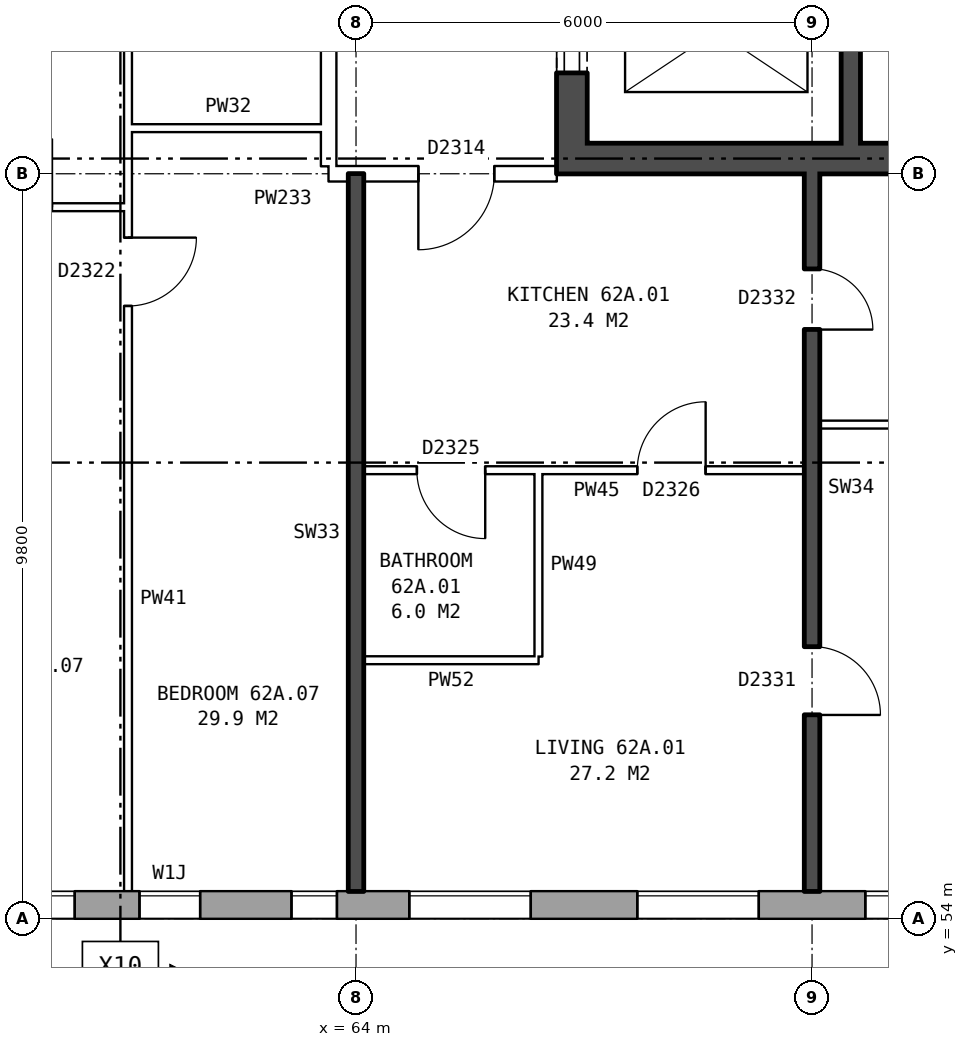
"""IFC4 building model, lengths in metres.
Left out: names, types, materials, properties, quantities, classifications, styles, units other than length and angle.
Written with IfcOpenShell. Run it as: python <this file> out.ifc"""

import sys

from ifc_helpers import new_model, si_unit, direction, frame, frame_2d, origin, place, context, subcontext, project, spatial, rectangle, extrude, element, fill, save


model = new_model("IFC4")
c1 = context("Model", 3, precision=1e-05, world=origin(), true_north=direction((0.0, 1.0)))
c2 = subcontext(c1, "Body", "Model", "MODEL_VIEW")
j1 = project(units=[si_unit("LENGTHUNIT", "METRE"), si_unit("PLANEANGLEUNIT", "RADIAN")], contexts=[c1])
p1 = place(None, origin())
s1 = spatial("IfcSite", under=j1, at=p1, CompositionType="ELEMENT")
p2 = place(p1, origin())
s2 = spatial("IfcBuilding", under=s1, at=p2, CompositionType="ELEMENT")
p3 = place(p2, frame((0.0, 0.0, 221.4)))
s3 = spatial("IfcBuildingStorey", under=s2, at=p3, CompositionType="ELEMENT", Elevation=221.4)
p4 = place(p3, frame((35.075, 54.18, 0.0), z_axis=(0.0, 0.0, 1.0), x_axis=(1.0, 0.0, 0.0)))
e1 = element("IfcWall", 1, at=p4, inside=s3, PredefinedType="STANDARD", context=c2, shape_type="SweptSolid", body=[
    extrude(rectangle(XDim=39.875, YDim=0.36, at=frame_2d((19.938, 0.0))), origin(), (0.0, 0.0, 1.0), 2.85),
])
p5 = place(p4, frame((2.625, 0.0, 0.8)))
e2 = element("IfcOpeningElement", 2, at=p5, cuts=e1, PredefinedType="OPENING", context=c2, shape_type="SweptSolid", body=[
    extrude(rectangle(XDim=1.6, YDim=1.8, at=frame_2d((0.8, 0.9))), frame((0.0, 0.19, 0.0), z_axis=(0.0, -1.0, 0.0), x_axis=(1.0, 0.0, 0.0)), (0.0, 0.0, 1.0), 0.38),
])
p6 = place(p4, frame((5.625, 0.0, 0.8)))
e3 = element("IfcOpeningElement", 3, at=p6, cuts=e1, PredefinedType="OPENING", context=c2, shape_type="SweptSolid", body=[
    extrude(rectangle(XDim=1.6, YDim=1.8, at=frame_2d((0.8, 0.9))), frame((0.0, 0.19, 0.0), z_axis=(0.0, -1.0, 0.0), x_axis=(1.0, 0.0, 0.0)), (0.0, 0.0, 1.0), 0.38),
])
p7 = place(p4, frame((7.525, 0.0, 0.8)))
e4 = element("IfcOpeningElement", 4, at=p7, cuts=e1, PredefinedType="OPENING", context=c2, shape_type="SweptSolid", body=[
    extrude(rectangle(XDim=1.4, YDim=1.8, at=frame_2d((0.7, 0.9))), frame((0.0, 0.19, 0.0), z_axis=(0.0, -1.0, 0.0), x_axis=(1.0, 0.0, 0.0)), (0.0, 0.0, 1.0), 0.38),
])
p8 = place(p4, frame((11.625, 0.0, 0.8)))
e5 = element("IfcOpeningElement", 5, at=p8, cuts=e1, PredefinedType="OPENING", context=c2, shape_type="SweptSolid", body=[
    extrude(rectangle(XDim=1.6, YDim=1.8, at=frame_2d((0.8, 0.9))), frame((0.0, 0.19, 0.0), z_axis=(0.0, -1.0, 0.0), x_axis=(1.0, 0.0, 0.0)), (0.0, 0.0, 1.0), 0.38),
])
p9 = place(p4, frame((14.625, 0.0, 0.8)))
e6 = element("IfcOpeningElement", 6, at=p9, cuts=e1, PredefinedType="OPENING", context=c2, shape_type="SweptSolid", body=[
    extrude(rectangle(XDim=1.6, YDim=1.8, at=frame_2d((0.8, 0.9))), frame((0.0, 0.19, 0.0), z_axis=(0.0, -1.0, 0.0), x_axis=(1.0, 0.0, 0.0)), (0.0, 0.0, 1.0), 0.38),
])
p10 = place(p4, frame((17.625, 0.0, 0.8)))
e7 = element("IfcOpeningElement", 7, at=p10, cuts=e1, PredefinedType="OPENING", context=c2, shape_type="SweptSolid", body=[
    extrude(rectangle(XDim=1.6, YDim=1.8, at=frame_2d((0.8, 0.9))), frame((0.0, 0.19, 0.0), z_axis=(0.0, -1.0, 0.0), x_axis=(1.0, 0.0, 0.0)), (0.0, 0.0, 1.0), 0.38),
])
p11 = place(p4, frame((20.625, 0.0, 0.8)))
e8 = element("IfcOpeningElement", 8, at=p11, cuts=e1, PredefinedType="OPENING", context=c2, shape_type="SweptSolid", body=[
    extrude(rectangle(XDim=1.6, YDim=1.8, at=frame_2d((0.8, 0.9))), frame((0.0, 0.19, 0.0), z_axis=(0.0, -1.0, 0.0), x_axis=(1.0, 0.0, 0.0)), (0.0, 0.0, 1.0), 0.38),
])
p12 = place(p4, frame((23.625, 0.0, 0.8)))
e9 = element("IfcOpeningElement", 9, at=p12, cuts=e1, PredefinedType="OPENING", context=c2, shape_type="SweptSolid", body=[
    extrude(rectangle(XDim=1.6, YDim=1.8, at=frame_2d((0.8, 0.9))), frame((0.0, 0.19, 0.0), z_axis=(0.0, -1.0, 0.0), x_axis=(1.0, 0.0, 0.0)), (0.0, 0.0, 1.0), 0.38),
])
p13 = place(p4, frame((26.075, 0.0, 0.15)))
e10 = element("IfcOpeningElement", 10, at=p13, cuts=e1, PredefinedType="OPENING", context=c2, shape_type="SweptSolid", body=[
    extrude(rectangle(XDim=0.8, YDim=1.5, at=frame_2d((0.4, 0.75))), frame((0.0, 0.19, 0.0), z_axis=(0.0, -1.0, 0.0), x_axis=(1.0, 0.0, 0.0)), (0.0, 0.0, 1.0), 0.38),
])
p14 = place(p4, frame((29.625, 0.0, 0.8)))
e11 = element("IfcOpeningElement", 11, at=p14, cuts=e1, PredefinedType="OPENING", context=c2, shape_type="SweptSolid", body=[
    extrude(rectangle(XDim=1.6, YDim=1.8, at=frame_2d((0.8, 0.9))), frame((0.0, 0.19, 0.0), z_axis=(0.0, -1.0, 0.0), x_axis=(1.0, 0.0, 0.0)), (0.0, 0.0, 1.0), 0.38),
])
p15 = place(p4, frame((32.625, 0.0, 0.8)))
e12 = element("IfcOpeningElement", 12, at=p15, cuts=e1, PredefinedType="OPENING", context=c2, shape_type="SweptSolid", body=[
    extrude(rectangle(XDim=1.6, YDim=1.8, at=frame_2d((0.8, 0.9))), frame((0.0, 0.19, 0.0), z_axis=(0.0, -1.0, 0.0), x_axis=(1.0, 0.0, 0.0)), (0.0, 0.0, 1.0), 0.38),
])
p16 = place(p4, frame((35.625, 0.0, 0.8)))
e13 = element("IfcOpeningElement", 13, at=p16, cuts=e1, PredefinedType="OPENING", context=c2, shape_type="SweptSolid", body=[
    extrude(rectangle(XDim=1.6, YDim=1.8, at=frame_2d((0.8, 0.9))), frame((0.0, 0.19, 0.0), z_axis=(0.0, -1.0, 0.0), x_axis=(1.0, 0.0, 0.0)), (0.0, 0.0, 1.0), 0.38),
])
p17 = place(p4, frame((9.225, 0.0, 1.7)))
e14 = element("IfcOpeningElement", 14, at=p17, cuts=e1, PredefinedType="OPENING", context=c2, shape_type="SweptSolid", body=[
    extrude(rectangle(XDim=0.6, YDim=0.9, at=frame_2d((0.3, 0.45))), frame((0.0, 0.19, 0.0), z_axis=(0.0, -1.0, 0.0), x_axis=(1.0, 0.0, 0.0)), (0.0, 0.0, 1.0), 0.38),
])
p18 = place(p4, frame((28.075, 0.0, 1.65)))
e15 = element("IfcOpeningElement", 15, at=p18, cuts=e1, PredefinedType="OPENING", context=c2, shape_type="SweptSolid", body=[
    extrude(rectangle(XDim=0.6, YDim=0.9, at=frame_2d((0.3, 0.45))), frame((0.0, 0.19, 0.0), z_axis=(0.0, -1.0, 0.0), x_axis=(1.0, 0.0, 0.0)), (0.0, 0.0, 1.0), 0.38),
])
p19 = place(p3, frame((66.84, 63.8, 0.0), z_axis=(0.0, 0.0, 1.0), x_axis=(0.0, 1.0, 0.0)))
e16 = element("IfcWall", 16, at=p19, inside=s3, PredefinedType="SHEAR", context=c2, shape_type="SweptSolid", body=[
    extrude(rectangle(XDim=12.4, YDim=0.4, at=frame_2d((6.2, 0.0))), origin(), (0.0, 0.0, 1.0), 2.85),
])
p20 = place(p19, frame((1.325, 0.0, 0.0)))
e17 = element("IfcOpeningElement", 17, at=p20, cuts=e16, PredefinedType="OPENING", context=c2, shape_type="SweptSolid", body=[
    extrude(rectangle(XDim=1.1, YDim=2.1, at=frame_2d((0.55, 1.05))), frame((0.0, 0.21, 0.0), z_axis=(0.0, -1.0, 0.0), x_axis=(1.0, 0.0, 0.0)), (0.0, 0.0, 1.0), 0.42),
])
p21 = place(p19, frame((3.6, 0.0, 0.0)))
e18 = element("IfcOpeningElement", 18, at=p21, cuts=e16, PredefinedType="OPENING", context=c2, shape_type="SweptSolid", body=[
    extrude(rectangle(XDim=1.1, YDim=2.1, at=frame_2d((0.55, 1.05))), frame((0.0, 0.21, 0.0), z_axis=(0.0, -1.0, 0.0), x_axis=(1.0, 0.0, 0.0)), (0.0, 0.0, 1.0), 0.42),
])
p22 = place(p19, frame((5.8, 0.0, 0.0)))
e19 = element("IfcOpeningElement", 19, at=p22, cuts=e16, PredefinedType="OPENING", context=c2, shape_type="SweptSolid", body=[
    extrude(rectangle(XDim=1.1, YDim=2.1, at=frame_2d((0.55, 1.05))), frame((0.0, 0.21, 0.0), z_axis=(0.0, -1.0, 0.0), x_axis=(1.0, 0.0, 0.0)), (0.0, 0.0, 1.0), 0.42),
])
p23 = place(p19, frame((8.0, 0.0, 0.0)))
e20 = element("IfcOpeningElement", 20, at=p23, cuts=e16, PredefinedType="OPENING", context=c2, shape_type="SweptSolid", body=[
    extrude(rectangle(XDim=1.1, YDim=2.1, at=frame_2d((0.55, 1.05))), frame((0.0, 0.21, 0.0), z_axis=(0.0, -1.0, 0.0), x_axis=(1.0, 0.0, 0.0)), (0.0, 0.0, 1.0), 0.42),
])
p24 = place(p19, frame((9.9, 0.0, 0.0)))
e21 = element("IfcOpeningElement", 21, at=p24, cuts=e16, PredefinedType="OPENING", context=c2, shape_type="SweptSolid", body=[
    extrude(rectangle(XDim=1.1, YDim=2.1, at=frame_2d((0.55, 1.05))), frame((0.0, 0.21, 0.0), z_axis=(0.0, -1.0, 0.0), x_axis=(1.0, 0.0, 0.0)), (0.0, 0.0, 1.0), 0.42),
])
p25 = place(p3, frame((67.04, 64.0, 0.0), z_axis=(0.0, 0.0, 1.0), x_axis=(1.0, 0.0, 0.0)))
e22 = element("IfcWall", 22, at=p25, inside=s3, PredefinedType="SHEAR", context=c2, shape_type="SweptSolid", body=[
    extrude(rectangle(XDim=8.2, YDim=0.4, at=frame_2d((4.1, 0.0))), origin(), (0.0, 0.0, 1.0), 2.85),
])
p26 = place(p3, frame((70.51, 64.2, 0.0), z_axis=(0.0, 0.0, 1.0), x_axis=(0.0, 1.0, 0.0)))
e23 = element("IfcWall", 23, at=p26, inside=s3, PredefinedType="SHEAR", context=c2, shape_type="SweptSolid", body=[
    extrude(rectangle(XDim=2.525, YDim=0.25, at=frame_2d((1.263, 0.0))), origin(), (0.0, 0.0, 1.0), 2.85),
])
p27 = place(p3, frame((63.64, 63.9, 0.0), z_axis=(0.0, 0.0, 1.0), x_axis=(0.0, 1.0, 0.0)))
e24 = element("IfcWall", 24, at=p27, inside=s3, PredefinedType="PARTITIONING", context=c2, shape_type="SweptSolid", body=[
    extrude(rectangle(XDim=12.2, YDim=0.2, at=frame_2d((6.1, 0.0))), origin(), (0.0, 0.0, 1.0), 2.85),
])
p28 = place(p27, frame((5.1, 0.0, 0.0)))
e25 = element("IfcOpeningElement", 25, at=p28, cuts=e24, PredefinedType="OPENING", context=c2, shape_type="SweptSolid", body=[
    extrude(rectangle(XDim=2.0, YDim=2.1, at=frame_2d((1.0, 1.05))), frame((0.0, 0.11, 0.0), z_axis=(0.0, -1.0, 0.0), x_axis=(1.0, 0.0, 0.0)), (0.0, 0.0, 1.0), 0.22),
])
p29 = place(p3, frame((64.1, 57.4, 0.0), z_axis=(0.0, 0.0, 1.0), x_axis=(1.0, 0.0, 0.0)))
e26 = element("IfcWall", 26, at=p29, inside=s3, PredefinedType="PARTITIONING", context=c2, shape_type="SweptSolid", body=[
    extrude(rectangle(XDim=2.3, YDim=0.1, at=frame_2d((1.15, 0.0))), origin(), (0.0, 0.0, 1.0), 2.85),
])
p30 = place(p3, frame((64.1, 59.9, 0.0), z_axis=(0.0, 0.0, 1.0), x_axis=(1.0, 0.0, 0.0)))
e27 = element("IfcWall", 27, at=p30, inside=s3, PredefinedType="PARTITIONING", context=c2, shape_type="SweptSolid", body=[
    extrude(rectangle(XDim=5.8, YDim=0.1, at=frame_2d((2.9, 0.0))), origin(), (0.0, 0.0, 1.0), 2.85),
])
p31 = place(p30, frame((3.6, 0.0, 0.0)))
e28 = element("IfcOpeningElement", 28, at=p31, cuts=e27, PredefinedType="OPENING", context=c2, shape_type="SweptSolid", body=[
    extrude(rectangle(XDim=0.9, YDim=2.1, at=frame_2d((0.45, 1.05))), frame((0.0, 0.06, 0.0), z_axis=(0.0, -1.0, 0.0), x_axis=(1.0, 0.0, 0.0)), (0.0, 0.0, 1.0), 0.12),
])
p32 = place(p30, frame((0.7, 0.0, 0.0)))
e29 = element("IfcOpeningElement", 29, at=p32, cuts=e27, PredefinedType="OPENING", context=c2, shape_type="SweptSolid", body=[
    extrude(rectangle(XDim=0.9, YDim=2.1, at=frame_2d((0.45, 1.05))), frame((0.0, 0.06, 0.0), z_axis=(0.0, -1.0, 0.0), x_axis=(1.0, 0.0, 0.0)), (0.0, 0.0, 1.0), 0.12),
])
p33 = place(p3, frame((70.1, 60.5, 0.0), z_axis=(0.0, 0.0, 1.0), x_axis=(1.0, 0.0, 0.0)))
e30 = element("IfcWall", 30, at=p33, inside=s3, PredefinedType="PARTITIONING", context=c2, shape_type="SweptSolid", body=[
    extrude(rectangle(XDim=5.8, YDim=0.1, at=frame_2d((2.9, 0.0))), origin(), (0.0, 0.0, 1.0), 2.85),
])
p34 = place(p3, frame((58.1, 63.36, 0.0), z_axis=(0.0, 0.0, 1.0), x_axis=(1.0, 0.0, 0.0)))
e31 = element("IfcWall", 31, at=p34, inside=s3, PredefinedType="PARTITIONING", context=c2, shape_type="SweptSolid", body=[
    extrude(rectangle(XDim=2.9, YDim=0.1, at=frame_2d((1.45, 0.0))), origin(), (0.0, 0.0, 1.0), 2.85),
])
p35 = place(p34, frame((1.0, 0.0, 0.0)))
e32 = element("IfcOpeningElement", 32, at=p35, cuts=e31, PredefinedType="OPENING", context=c2, shape_type="SweptSolid", body=[
    extrude(rectangle(XDim=0.9, YDim=2.1, at=frame_2d((0.45, 1.05))), frame((0.0, 0.06, 0.0), z_axis=(0.0, -1.0, 0.0), x_axis=(1.0, 0.0, 0.0)), (0.0, 0.0, 1.0), 0.12),
])
p36 = place(p3, frame((63.64, 63.8, 0.0), z_axis=(0.0, 0.0, 1.0), x_axis=(1.0, 0.0, 0.0)))
e33 = element("IfcWall", 33, at=p36, inside=s3, PredefinedType="PARTITIONING", context=c2, shape_type="SweptSolid", body=[
    extrude(rectangle(XDim=3.0, YDim=0.2, at=frame_2d((1.5, 0.0))), origin(), (0.0, 0.0, 1.0), 2.85),
])
p37 = place(p36, frame((1.18, 0.0, 0.0)))
e34 = element("IfcOpeningElement", 34, at=p37, cuts=e33, PredefinedType="OPENING", context=c2, shape_type="SweptSolid", body=[
    extrude(rectangle(XDim=1.0, YDim=2.1, at=frame_2d((0.5, 1.05))), frame((0.0, 0.11, 0.0), z_axis=(0.0, -1.0, 0.0), x_axis=(1.0, 0.0, 0.0)), (0.0, 0.0, 1.0), 0.22),
])
p38 = place(p3, frame((61.0, 64.4, 0.0), z_axis=(0.0, 0.0, 1.0), x_axis=(1.0, 0.0, 0.0)))
e35 = element("IfcWall", 35, at=p38, inside=s3, PredefinedType="PARTITIONING", context=c2, shape_type="SweptSolid", body=[
    extrude(rectangle(XDim=2.64, YDim=0.1, at=frame_2d((1.32, 0.0))), origin(), (0.0, 0.0, 1.0), 2.85),
])
p39 = place(p3, frame((61.0, 54.36, 0.0), z_axis=(0.0, 0.0, 1.0), x_axis=(0.0, 1.0, 0.0)))
e36 = element("IfcWall", 36, at=p39, inside=s3, PredefinedType="PARTITIONING", context=c2, shape_type="SweptSolid", body=[
    extrude(rectangle(XDim=14.34, YDim=0.1, at=frame_2d((7.17, 0.0))), origin(), (0.0, 0.0, 1.0), 2.85),
])
p40 = place(p39, frame((7.7, 0.0, 0.0)))
e37 = element("IfcOpeningElement", 37, at=p40, cuts=e36, PredefinedType="OPENING", context=c2, shape_type="SweptSolid", body=[
    extrude(rectangle(XDim=0.9, YDim=2.1, at=frame_2d((0.45, 1.05))), frame((0.0, 0.06, 0.0), z_axis=(0.0, -1.0, 0.0), x_axis=(1.0, 0.0, 0.0)), (0.0, 0.0, 1.0), 0.12),
])
p41 = place(p39, frame((13.04, 0.0, 0.0)))
e38 = element("IfcOpeningElement", 38, at=p41, cuts=e36, PredefinedType="OPENING", context=c2, shape_type="SweptSolid", body=[
    extrude(rectangle(XDim=0.9, YDim=2.1, at=frame_2d((0.45, 1.05))), frame((0.0, 0.06, 0.0), z_axis=(0.0, -1.0, 0.0), x_axis=(1.0, 0.0, 0.0)), (0.0, 0.0, 1.0), 0.12),
])
p42 = place(p3, frame((64.0, 54.36, 0.0), z_axis=(0.0, 0.0, 1.0), x_axis=(0.0, 1.0, 0.0)))
e39 = element("IfcWall", 39, at=p42, inside=s3, PredefinedType="SOLIDWALL", context=c2, shape_type="SweptSolid", body=[
    extrude(rectangle(XDim=9.44, YDim=0.2, at=frame_2d((4.72, 0.0))), origin(), (0.0, 0.0, 1.0), 2.85),
])
p43 = place(p3, frame((66.4, 57.45, 0.0), z_axis=(0.0, 0.0, 1.0), x_axis=(0.0, 1.0, 0.0)))
e40 = element("IfcWall", 40, at=p43, inside=s3, PredefinedType="PARTITIONING", context=c2, shape_type="SweptSolid", body=[
    extrude(rectangle(XDim=2.4, YDim=0.1, at=frame_2d((1.2, 0.0))), origin(), (0.0, 0.0, 1.0), 2.85),
])
p44 = place(p3, frame((70.0, 54.36, 0.0), z_axis=(0.0, 0.0, 1.0), x_axis=(0.0, 1.0, 0.0)))
e41 = element("IfcWall", 41, at=p44, inside=s3, PredefinedType="SOLIDWALL", context=c2, shape_type="SweptSolid", body=[
    extrude(rectangle(XDim=9.44, YDim=0.2, at=frame_2d((4.72, 0.0))), origin(), (0.0, 0.0, 1.0), 2.85),
])
p45 = place(p44, frame((2.32, 0.0, 0.0)))
e42 = element("IfcOpeningElement", 42, at=p45, cuts=e41, PredefinedType="OPENING", context=c2, shape_type="SweptSolid", body=[
    extrude(rectangle(XDim=0.9, YDim=2.1, at=frame_2d((0.45, 1.05))), frame((0.0, 0.11, 0.0), z_axis=(0.0, -1.0, 0.0), x_axis=(1.0, 0.0, 0.0)), (0.0, 0.0, 1.0), 0.22),
])
p46 = place(p44, frame((7.39, 0.0, 0.0)))
e43 = element("IfcOpeningElement", 43, at=p46, cuts=e41, PredefinedType="OPENING", context=c2, shape_type="SweptSolid", body=[
    extrude(rectangle(XDim=0.8, YDim=2.1, at=frame_2d((0.4, 1.05))), frame((0.0, 0.11, 0.0), z_axis=(0.0, -1.0, 0.0), x_axis=(1.0, 0.0, 0.0)), (0.0, 0.0, 1.0), 0.22),
])
p47 = place(p12, origin())
e44 = element("IfcWindow", 44, at=p47, inside=s3, PartitioningType="SINGLE_PANEL", PredefinedType="WINDOW", context=c2, shape_type="SweptSolid", body=[
    extrude(rectangle(XDim=1.6, YDim=1.8, at=frame_2d((0.8, 0.9))), frame((0.0, 0.15, 0.0), z_axis=(0.0, -1.0, 0.0), x_axis=(1.0, 0.0, 0.0)), (0.0, 0.0, 1.0), 0.06),
])
fill(e9, e44)
p48 = place(p13, origin())
e45 = element("IfcWindow", 45, at=p48, inside=s3, PartitioningType="SINGLE_PANEL", PredefinedType="WINDOW", context=c2, shape_type="SweptSolid", body=[
    extrude(rectangle(XDim=0.8, YDim=1.5, at=frame_2d((0.4, 0.75))), frame((0.0, 0.15, 0.0), z_axis=(0.0, -1.0, 0.0), x_axis=(1.0, 0.0, 0.0)), (0.0, 0.0, 1.0), 0.06),
])
fill(e10, e45)
p49 = place(p14, origin())
e46 = element("IfcWindow", 46, at=p49, inside=s3, PartitioningType="SINGLE_PANEL", PredefinedType="WINDOW", context=c2, shape_type="SweptSolid", body=[
    extrude(rectangle(XDim=1.6, YDim=1.8, at=frame_2d((0.8, 0.9))), frame((0.0, 0.15, 0.0), z_axis=(0.0, -1.0, 0.0), x_axis=(1.0, 0.0, 0.0)), (0.0, 0.0, 1.0), 0.06),
])
fill(e11, e46)
p50 = place(p15, origin())
e47 = element("IfcWindow", 47, at=p50, inside=s3, PartitioningType="SINGLE_PANEL", PredefinedType="WINDOW", context=c2, shape_type="SweptSolid", body=[
    extrude(rectangle(XDim=1.6, YDim=1.8, at=frame_2d((0.8, 0.9))), frame((0.0, 0.15, 0.0), z_axis=(0.0, -1.0, 0.0), x_axis=(1.0, 0.0, 0.0)), (0.0, 0.0, 1.0), 0.06),
])
fill(e12, e47)
p51 = place(p16, origin())
e48 = element("IfcWindow", 48, at=p51, inside=s3, PartitioningType="SINGLE_PANEL", PredefinedType="WINDOW", context=c2, shape_type="SweptSolid", body=[
    extrude(rectangle(XDim=1.6, YDim=1.8, at=frame_2d((0.8, 0.9))), frame((0.0, 0.15, 0.0), z_axis=(0.0, -1.0, 0.0), x_axis=(1.0, 0.0, 0.0)), (0.0, 0.0, 1.0), 0.06),
])
fill(e13, e48)
p52 = place(p20, origin())
e49 = element("IfcDoor", 49, at=p52, inside=s3, OperationType="DOUBLE_DOOR_SLIDING", PredefinedType="DOOR", context=c2, shape_type="SweptSolid", body=[
    extrude(rectangle(XDim=1.1, YDim=2.1, at=frame_2d((0.55, 1.05))), frame((0.0, -0.135, 0.0), z_axis=(0.0, -1.0, 0.0), x_axis=(1.0, 0.0, 0.0)), (0.0, 0.0, 1.0), 0.05),
])
fill(e17, e49)
p53 = place(p45, frame((0.9, 0.0, 0.0), z_axis=(0.0, 0.0, 1.0), x_axis=(-1.0, 0.0, 0.0)))
e50 = element("IfcDoor", 50, at=p53, inside=s3, OperationType="SINGLE_SWING_RIGHT", PredefinedType="DOOR", context=c2, shape_type="SweptSolid", body=[
    extrude(rectangle(XDim=0.9, YDim=2.1, at=frame_2d((0.45, 1.05))), frame((0.0, 0.025, 0.0), z_axis=(0.0, -1.0, 0.0), x_axis=(1.0, 0.0, 0.0)), (0.0, 0.0, 1.0), 0.05),
])
fill(e42, e50)
p54 = place(p37, frame((1.0, 0.0, 0.0), z_axis=(0.0, 0.0, 1.0), x_axis=(-1.0, 0.0, 0.0)))
e51 = element("IfcDoor", 51, at=p54, inside=s3, OperationType="SINGLE_SWING_RIGHT", PredefinedType="DOOR", context=c2, shape_type="SweptSolid", body=[
    extrude(rectangle(XDim=1.0, YDim=2.1, at=frame_2d((0.5, 1.05))), frame((0.0, 0.025, 0.0), z_axis=(0.0, -1.0, 0.0), x_axis=(1.0, 0.0, 0.0)), (0.0, 0.0, 1.0), 0.05),
])
fill(e34, e51)
p55 = place(p31, origin())
e52 = element("IfcDoor", 52, at=p55, inside=s3, OperationType="SINGLE_SWING_RIGHT", PredefinedType="DOOR", context=c2, shape_type="SweptSolid", body=[
    extrude(rectangle(XDim=0.9, YDim=2.1, at=frame_2d((0.45, 1.05))), frame((0.0, 0.025, 0.0), z_axis=(0.0, -1.0, 0.0), x_axis=(1.0, 0.0, 0.0)), (0.0, 0.0, 1.0), 0.05),
])
fill(e28, e52)
p56 = place(p46, frame((0.8, 0.0, 0.0), z_axis=(0.0, 0.0, 1.0), x_axis=(-1.0, 0.0, 0.0)))
e53 = element("IfcDoor", 53, at=p56, inside=s3, OperationType="SINGLE_SWING_RIGHT", PredefinedType="DOOR", context=c2, shape_type="SweptSolid", body=[
    extrude(rectangle(XDim=0.8, YDim=2.1, at=frame_2d((0.4, 1.05))), frame((0.0, 0.025, 0.0), z_axis=(0.0, -1.0, 0.0), x_axis=(1.0, 0.0, 0.0)), (0.0, 0.0, 1.0), 0.05),
])
fill(e43, e53)
p57 = place(p32, frame((0.9, 0.0, 0.0), z_axis=(0.0, 0.0, 1.0), x_axis=(-1.0, 0.0, 0.0)))
e54 = element("IfcDoor", 54, at=p57, inside=s3, OperationType="SINGLE_SWING_LEFT", PredefinedType="DOOR", context=c2, shape_type="SweptSolid", body=[
    extrude(rectangle(XDim=0.9, YDim=2.1, at=frame_2d((0.45, 1.05))), frame((0.0, 0.025, 0.0), z_axis=(0.0, -1.0, 0.0), x_axis=(1.0, 0.0, 0.0)), (0.0, 0.0, 1.0), 0.05),
])
fill(e29, e54)
p58 = place(p40, frame((0.9, 0.0, 0.0), z_axis=(0.0, 0.0, 1.0), x_axis=(-1.0, 0.0, 0.0)))
e55 = element("IfcDoor", 55, at=p58, inside=s3, OperationType="SINGLE_SWING_LEFT", PredefinedType="DOOR", context=c2, shape_type="SweptSolid", body=[
    extrude(rectangle(XDim=0.9, YDim=2.1, at=frame_2d((0.45, 1.05))), frame((0.0, 0.025, 0.0), z_axis=(0.0, -1.0, 0.0), x_axis=(1.0, 0.0, 0.0)), (0.0, 0.0, 1.0), 0.05),
])
fill(e37, e55)
p59 = place(p18, origin())
e56 = element("IfcWindow", 56, at=p59, inside=s3, PartitioningType="SINGLE_PANEL", PredefinedType="WINDOW", context=c2, shape_type="SweptSolid", body=[
    extrude(rectangle(XDim=0.6, YDim=0.9, at=frame_2d((0.3, 0.45))), frame((0.0, 0.15, 0.0), z_axis=(0.0, -1.0, 0.0), x_axis=(1.0, 0.0, 0.0)), (0.0, 0.0, 1.0), 0.06),
])
fill(e15, e56)
save(model, sys.argv[1])
